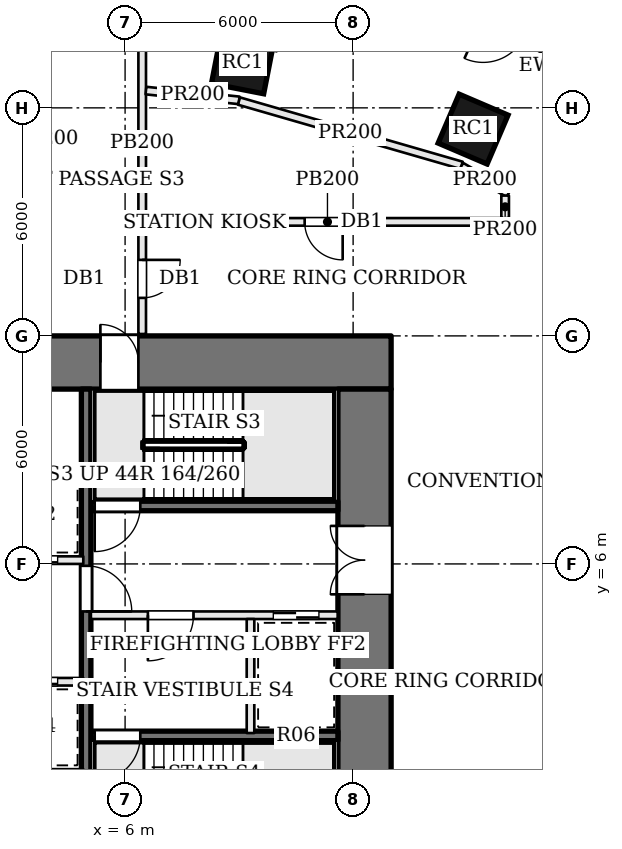
"""IFC4 building model, lengths in metres.
Left out: names, types, materials, properties, quantities, classifications, styles, units other than length and angle.
Written with IfcOpenShell. Run it as: python <this file> out.ifc"""

import sys

from ifc_helpers import new_model, si_unit, direction, frame, frame_2d, origin, origin_2d, place, context, subcontext, project, spatial, rectangle, extrude, element, fill, save


model = new_model("IFC4")
c1 = context("Model", 3, precision=1e-05, world=origin(), true_north=direction((0.0, 1.0)))
c2 = subcontext(c1, "Body", "Model", "MODEL_VIEW")
j1 = project(units=[si_unit("LENGTHUNIT", "METRE"), si_unit("PLANEANGLEUNIT", "RADIAN")], contexts=[c1])
p1 = place(None, origin())
s1 = spatial("IfcSite", under=j1, at=p1, CompositionType="ELEMENT")
p2 = place(p1, origin())
s2 = spatial("IfcBuilding", under=s1, at=p2, CompositionType="ELEMENT")
p3 = place(p2, origin())
s3 = spatial("IfcBuildingStorey", under=s2, at=p3, CompositionType="ELEMENT", Elevation=0.0)
p4 = place(p3, frame((-13.0, 11.3, 0.0), z_axis=(0.0, 0.0, 1.0), x_axis=(1.0, 0.0, 0.0)))
e1 = element("IfcWall", 1, at=p4, inside=s3, PredefinedType="SHEAR", context=c2, shape_type="SweptSolid", body=[
    extrude(rectangle(XDim=26.0, YDim=1.4, at=frame_2d((13.0, 0.0))), origin(), (0.0, 0.0, 1.0), 7.2),
])
p5 = place(p4, frame((8.975, 0.0, 0.0)))
e2 = element("IfcOpeningElement", 2, at=p5, cuts=e1, PredefinedType="OPENING", context=c2, shape_type="SweptSolid", body=[
    extrude(rectangle(XDim=0.7, YDim=2.1, at=frame_2d((0.35, 1.05))), frame((0.0, 0.71, 0.0), z_axis=(0.0, -1.0, 0.0), x_axis=(1.0, 0.0, 0.0)), (0.0, 0.0, 1.0), 1.42),
])
p6 = place(p4, frame((11.425, 0.0, 0.0)))
e3 = element("IfcOpeningElement", 3, at=p6, cuts=e1, PredefinedType="OPENING", context=c2, shape_type="SweptSolid", body=[
    extrude(rectangle(XDim=0.7, YDim=2.1, at=frame_2d((0.35, 1.05))), frame((0.0, 0.71, 0.0), z_axis=(0.0, -1.0, 0.0), x_axis=(1.0, 0.0, 0.0)), (0.0, 0.0, 1.0), 1.42),
])
p7 = place(p4, frame((13.725, 0.0, 0.0)))
e4 = element("IfcOpeningElement", 4, at=p7, cuts=e1, PredefinedType="OPENING", context=c2, shape_type="SweptSolid", body=[
    extrude(rectangle(XDim=1.0, YDim=2.1, at=frame_2d((0.5, 1.05))), frame((0.0, 0.71, 0.0), z_axis=(0.0, -1.0, 0.0), x_axis=(1.0, 0.0, 0.0)), (0.0, 0.0, 1.0), 1.42),
])
p8 = place(p4, frame((15.65, 0.0, 0.0)))
e5 = element("IfcOpeningElement", 5, at=p8, cuts=e1, PredefinedType="OPENING", context=c2, shape_type="SweptSolid", body=[
    extrude(rectangle(XDim=1.0, YDim=2.1, at=frame_2d((0.5, 1.05))), frame((0.0, 0.71, 0.0), z_axis=(0.0, -1.0, 0.0), x_axis=(1.0, 0.0, 0.0)), (0.0, 0.0, 1.0), 1.42),
])
p9 = place(p4, frame((6.65, 0.0, 0.0)))
e6 = element("IfcOpeningElement", 6, at=p9, cuts=e1, PredefinedType="OPENING", context=c2, shape_type="SweptSolid", body=[
    extrude(rectangle(XDim=1.0, YDim=2.1, at=frame_2d((0.5, 1.05))), frame((0.0, 0.71, 0.0), z_axis=(0.0, -1.0, 0.0), x_axis=(1.0, 0.0, 0.0)), (0.0, 0.0, 1.0), 1.42),
])
p10 = place(p4, frame((18.35, 0.0, 0.0)))
e7 = element("IfcOpeningElement", 7, at=p10, cuts=e1, PredefinedType="OPENING", context=c2, shape_type="SweptSolid", body=[
    extrude(rectangle(XDim=1.0, YDim=2.1, at=frame_2d((0.5, 1.05))), frame((0.0, 0.71, 0.0), z_axis=(0.0, -1.0, 0.0), x_axis=(1.0, 0.0, 0.0)), (0.0, 0.0, 1.0), 1.42),
])
p11 = place(p3, frame((12.3, -1.6, 0.0), z_axis=(0.0, 0.0, 1.0), x_axis=(0.0, 1.0, 0.0)))
e8 = element("IfcWall", 8, at=p11, inside=s3, PredefinedType="SHEAR", context=c2, shape_type="SweptSolid", body=[
    extrude(rectangle(XDim=12.2, YDim=1.4, at=frame_2d((6.1, 0.0))), origin(), (0.0, 0.0, 1.0), 7.2),
])
p12 = place(p11, frame((6.8, 0.0, 0.0)))
e9 = element("IfcOpeningElement", 9, at=p12, cuts=e8, PredefinedType="OPENING", context=c2, shape_type="SweptSolid", body=[
    extrude(rectangle(XDim=1.8, YDim=2.1, at=frame_2d((0.9, 1.05))), frame((0.0, 0.71, 0.0), z_axis=(0.0, -1.0, 0.0), x_axis=(1.0, 0.0, 0.0)), (0.0, 0.0, 1.0), 1.42),
])
for number, where, z_axis, x_axis in (
    (10, (15.157, 17.441, 0.0), (0.0, 0.0, 1.0), (-0.919, 0.394, 0.0)),
    (11, (9.094, 19.192, 0.0), (0.0, 0.0, 1.0), (-0.981, 0.192, 0.0)),
):
    element("IfcColumn", number, at=place(p3, frame(where, z_axis=z_axis, x_axis=x_axis)), inside=s3, PredefinedType="COLUMN", context=c2, shape_type="SweptSolid", body=[
        extrude(rectangle(XDim=1.4, YDim=1.4, at=origin_2d()), origin(), (0.0, 0.0, 1.0), 7.2),
    ])
p13 = place(p3, frame((18.934, 18.821, 0.0), z_axis=(0.0, 0.0, 1.0), x_axis=(-0.912571415594, 0.408917365052, 0.0)))
e12 = element("IfcWall", 12, at=p13, inside=s3, PredefinedType="SOLIDWALL", context=c2, shape_type="SweptSolid", body=[
    extrude(rectangle(XDim=4.301, YDim=0.45, at=frame_2d((2.15, 0.0))), origin(), (0.0, 0.0, 1.0), 6.95),
])
p14 = place(p13, frame((0.45, 0.0, 0.9)))
e13 = element("IfcOpeningElement", 13, at=p14, cuts=e12, PredefinedType="OPENING", context=c2, shape_type="SweptSolid", body=[
    extrude(rectangle(XDim=2.1, YDim=5.0, at=frame_2d((1.05, 2.5))), frame((0.0, 0.235, 0.0), z_axis=(0.0, -1.0, 0.0), x_axis=(1.0, 0.0, 0.0)), (0.0, 0.0, 1.0), 0.47),
])
p15 = place(p13, frame((2.651, 0.0, 0.0)))
e14 = element("IfcOpeningElement", 14, at=p15, cuts=e12, PredefinedType="OPENING", context=c2, shape_type="SweptSolid", body=[
    extrude(rectangle(XDim=1.2, YDim=2.4, at=frame_2d((0.6, 1.2))), frame((0.0, 0.235, 0.0), z_axis=(0.0, -1.0, 0.0), x_axis=(1.0, 0.0, 0.0)), (0.0, 0.0, 1.0), 0.47),
])
p16 = place(p3, frame((11.6, 7.525, 0.0), z_axis=(0.0, 0.0, 1.0), x_axis=(-1.0, 0.0, 0.0)))
e15 = element("IfcWall", 15, at=p16, inside=s3, PredefinedType="SOLIDWALL", context=c2, shape_type="SweptSolid", body=[
    extrude(rectangle(XDim=6.5, YDim=0.25, at=frame_2d((3.25, 0.0))), origin(), (0.0, 0.0, 1.0), 6.95),
])
p17 = place(p16, frame((5.2, 0.0, 0.0)))
e16 = element("IfcOpeningElement", 16, at=p17, cuts=e15, PredefinedType="OPENING", context=c2, shape_type="SweptSolid", body=[
    extrude(rectangle(XDim=1.2, YDim=2.1, at=frame_2d((0.6, 1.05))), frame((0.0, 0.135, 0.0), z_axis=(0.0, -1.0, 0.0), x_axis=(1.0, 0.0, 0.0)), (0.0, 0.0, 1.0), 0.27),
])
p18 = place(p3, frame((11.6, 4.65, 0.0), z_axis=(0.0, 0.0, 1.0), x_axis=(-1.0, 0.0, 0.0)))
e17 = element("IfcWall", 17, at=p18, inside=s3, PredefinedType="SOLIDWALL", context=c2, shape_type="SweptSolid", body=[
    extrude(rectangle(XDim=6.5, YDim=0.2, at=frame_2d((3.25, 0.0))), origin(), (0.0, 0.0, 1.0), 6.95),
])
p19 = place(p18, frame((3.8, 0.0, 0.0)))
e18 = element("IfcOpeningElement", 18, at=p19, cuts=e17, PredefinedType="OPENING", context=c2, shape_type="SweptSolid", body=[
    extrude(rectangle(XDim=1.2, YDim=2.1, at=frame_2d((0.6, 1.05))), frame((0.0, 0.11, 0.0), z_axis=(0.0, -1.0, 0.0), x_axis=(1.0, 0.0, 0.0)), (0.0, 0.0, 1.0), 0.22),
])
p20 = place(p18, frame((0.5, 0.0, 0.0)))
e19 = element("IfcOpeningElement", 19, at=p20, cuts=e17, PredefinedType="OPENING", context=c2, shape_type="SweptSolid", body=[
    extrude(rectangle(XDim=1.2, YDim=2.1, at=frame_2d((0.6, 1.05))), frame((0.0, 0.11, 0.0), z_axis=(0.0, -1.0, 0.0), x_axis=(1.0, 0.0, 0.0)), (0.0, 0.0, 1.0), 0.22),
])
p21 = place(p3, frame((11.6, 1.475, 0.0), z_axis=(0.0, 0.0, 1.0), x_axis=(-1.0, 0.0, 0.0)))
e20 = element("IfcWall", 20, at=p21, inside=s3, PredefinedType="SOLIDWALL", context=c2, shape_type="SweptSolid", body=[
    extrude(rectangle(XDim=6.5, YDim=0.25, at=frame_2d((3.25, 0.0))), origin(), (0.0, 0.0, 1.0), 6.95),
])
p22 = place(p21, frame((5.2, 0.0, 0.0)))
e21 = element("IfcOpeningElement", 21, at=p22, cuts=e20, PredefinedType="OPENING", context=c2, shape_type="SweptSolid", body=[
    extrude(rectangle(XDim=1.2, YDim=2.1, at=frame_2d((0.6, 1.05))), frame((0.0, 0.135, 0.0), z_axis=(0.0, -1.0, 0.0), x_axis=(1.0, 0.0, 0.0)), (0.0, 0.0, 1.0), 0.27),
])
p23 = place(p3, frame((9.3, 4.55, 0.0), z_axis=(0.0, 0.0, 1.0), x_axis=(0.0, -1.0, 0.0)))
e22 = element("IfcWall", 22, at=p23, inside=s3, PredefinedType="SOLIDWALL", context=c2, shape_type="SweptSolid", body=[
    extrude(rectangle(XDim=3.0, YDim=0.2, at=frame_2d((1.5, 0.0))), origin(), (0.0, 0.0, 1.0), 6.95),
])
p24 = place(p3, frame((4.975, 10.6, 0.0), z_axis=(0.0, 0.0, 1.0), x_axis=(0.0, -1.0, 0.0)))
e23 = element("IfcWall", 23, at=p24, inside=s3, PredefinedType="SOLIDWALL", context=c2, shape_type="SweptSolid", body=[
    extrude(rectangle(XDim=12.2, YDim=0.25, at=frame_2d((6.1, 0.0))), origin(), (0.0, 0.0, 1.0), 6.95),
])
p25 = place(p24, frame((4.65, 0.0, 0.0)))
e24 = element("IfcOpeningElement", 24, at=p25, cuts=e23, PredefinedType="OPENING", context=c2, shape_type="SweptSolid", body=[
    extrude(rectangle(XDim=1.2, YDim=2.1, at=frame_2d((0.6, 1.05))), frame((0.0, 0.135, 0.0), z_axis=(0.0, -1.0, 0.0), x_axis=(1.0, 0.0, 0.0)), (0.0, 0.0, 1.0), 0.27),
])
p26 = place(p3, frame((-4.9, 2.9, 0.0), z_axis=(0.0, 0.0, 1.0), x_axis=(1.0, 0.0, 0.0)))
e25 = element("IfcWall", 25, at=p26, inside=s3, PredefinedType="SOLIDWALL", context=c2, shape_type="SweptSolid", body=[
    extrude(rectangle(XDim=9.8, YDim=0.2, at=frame_2d((4.9, 0.0))), origin(), (0.0, 0.0, 1.0), 6.95),
])
p27 = place(p26, frame((0.675, 0.0, 0.0)))
e26 = element("IfcOpeningElement", 26, at=p27, cuts=e25, PredefinedType="OPENING", context=c2, shape_type="SweptSolid", body=[
    extrude(rectangle(XDim=1.1, YDim=2.1, at=frame_2d((0.55, 1.05))), frame((0.0, 0.11, 0.0), z_axis=(0.0, -1.0, 0.0), x_axis=(1.0, 0.0, 0.0)), (0.0, 0.0, 1.0), 0.22),
])
p28 = place(p26, frame((3.125, 0.0, 0.0)))
e27 = element("IfcOpeningElement", 27, at=p28, cuts=e25, PredefinedType="OPENING", context=c2, shape_type="SweptSolid", body=[
    extrude(rectangle(XDim=1.1, YDim=2.1, at=frame_2d((0.55, 1.05))), frame((0.0, 0.11, 0.0), z_axis=(0.0, -1.0, 0.0), x_axis=(1.0, 0.0, 0.0)), (0.0, 0.0, 1.0), 0.22),
])
p29 = place(p26, frame((5.575, 0.0, 0.0)))
e28 = element("IfcOpeningElement", 28, at=p29, cuts=e25, PredefinedType="OPENING", context=c2, shape_type="SweptSolid", body=[
    extrude(rectangle(XDim=1.1, YDim=2.1, at=frame_2d((0.55, 1.05))), frame((0.0, 0.11, 0.0), z_axis=(0.0, -1.0, 0.0), x_axis=(1.0, 0.0, 0.0)), (0.0, 0.0, 1.0), 0.22),
])
p30 = place(p26, frame((8.025, 0.0, 0.0)))
e29 = element("IfcOpeningElement", 29, at=p30, cuts=e25, PredefinedType="OPENING", context=c2, shape_type="SweptSolid", body=[
    extrude(rectangle(XDim=1.1, YDim=2.1, at=frame_2d((0.55, 1.05))), frame((0.0, 0.11, 0.0), z_axis=(0.0, -1.0, 0.0), x_axis=(1.0, 0.0, 0.0)), (0.0, 0.0, 1.0), 0.22),
])
p31 = place(p3, frame((-4.9, 6.1, 0.0), z_axis=(0.0, 0.0, 1.0), x_axis=(1.0, 0.0, 0.0)))
e30 = element("IfcWall", 30, at=p31, inside=s3, PredefinedType="SOLIDWALL", context=c2, shape_type="SweptSolid", body=[
    extrude(rectangle(XDim=9.8, YDim=0.2, at=frame_2d((4.9, 0.0))), origin(), (0.0, 0.0, 1.0), 6.95),
])
p32 = place(p31, frame((0.675, 0.0, 0.0)))
e31 = element("IfcOpeningElement", 31, at=p32, cuts=e30, PredefinedType="OPENING", context=c2, shape_type="SweptSolid", body=[
    extrude(rectangle(XDim=1.1, YDim=2.1, at=frame_2d((0.55, 1.05))), frame((0.0, 0.11, 0.0), z_axis=(0.0, -1.0, 0.0), x_axis=(1.0, 0.0, 0.0)), (0.0, 0.0, 1.0), 0.22),
])
p33 = place(p31, frame((3.125, 0.0, 0.0)))
e32 = element("IfcOpeningElement", 32, at=p33, cuts=e30, PredefinedType="OPENING", context=c2, shape_type="SweptSolid", body=[
    extrude(rectangle(XDim=1.1, YDim=2.1, at=frame_2d((0.55, 1.05))), frame((0.0, 0.11, 0.0), z_axis=(0.0, -1.0, 0.0), x_axis=(1.0, 0.0, 0.0)), (0.0, 0.0, 1.0), 0.22),
])
p34 = place(p31, frame((5.575, 0.0, 0.0)))
e33 = element("IfcOpeningElement", 33, at=p34, cuts=e30, PredefinedType="OPENING", context=c2, shape_type="SweptSolid", body=[
    extrude(rectangle(XDim=1.1, YDim=2.1, at=frame_2d((0.55, 1.05))), frame((0.0, 0.11, 0.0), z_axis=(0.0, -1.0, 0.0), x_axis=(1.0, 0.0, 0.0)), (0.0, 0.0, 1.0), 0.22),
])
p35 = place(p31, frame((8.025, 0.0, 0.0)))
e34 = element("IfcOpeningElement", 34, at=p35, cuts=e30, PredefinedType="OPENING", context=c2, shape_type="SweptSolid", body=[
    extrude(rectangle(XDim=1.1, YDim=2.1, at=frame_2d((0.55, 1.05))), frame((0.0, 0.11, 0.0), z_axis=(0.0, -1.0, 0.0), x_axis=(1.0, 0.0, 0.0)), (0.0, 0.0, 1.0), 0.22),
])
p36 = place(p3, frame((-4.9, 8.5, 0.0), z_axis=(0.0, 0.0, 1.0), x_axis=(1.0, 0.0, 0.0)))
e35 = element("IfcWall", 35, at=p36, inside=s3, PredefinedType="SOLIDWALL", context=c2, shape_type="SweptSolid", body=[
    extrude(rectangle(XDim=9.8, YDim=0.2, at=frame_2d((4.9, 0.0))), origin(), (0.0, 0.0, 1.0), 6.95),
])
p37 = place(p3, frame((6.45, 22.097, 0.0), z_axis=(0.0, 0.0, 1.0), x_axis=(0.0, -1.0, 0.0)))
e36 = element("IfcWall", 36, at=p37, inside=s3, PredefinedType="PARTITIONING", context=c2, shape_type="SweptSolid", body=[
    extrude(rectangle(XDim=10.047, YDim=0.2, at=frame_2d((5.023, 0.0))), origin(), (0.0, 0.0, 1.0), 6.23),
])
p38 = place(p37, frame((8.097, 0.0, 0.0)))
e37 = element("IfcOpeningElement", 37, at=p38, cuts=e36, PredefinedType="OPENING", context=c2, shape_type="SweptSolid", body=[
    extrude(rectangle(XDim=1.0, YDim=2.1, at=frame_2d((0.5, 1.05))), frame((0.0, 0.11, 0.0), z_axis=(0.0, -1.0, 0.0), x_axis=(1.0, 0.0, 0.0)), (0.0, 0.0, 1.0), 0.22),
])
p39 = place(p3, frame((16.1, 15.0, 0.0), z_axis=(0.0, 0.0, 1.0), x_axis=(-1.0, 0.0, 0.0)))
e38 = element("IfcWall", 38, at=p39, inside=s3, PredefinedType="PARTITIONING", context=c2, shape_type="SweptSolid", body=[
    extrude(rectangle(XDim=9.55, YDim=0.2, at=frame_2d((4.775, 0.0))), origin(), (0.0, 0.0, 1.0), 6.23),
])
p40 = place(p39, frame((4.375, 0.0, 0.0)))
e39 = element("IfcOpeningElement", 39, at=p40, cuts=e38, PredefinedType="OPENING", context=c2, shape_type="SweptSolid", body=[
    extrude(rectangle(XDim=1.0, YDim=2.1, at=frame_2d((0.5, 1.05))), frame((0.0, 0.11, 0.0), z_axis=(0.0, -1.0, 0.0), x_axis=(1.0, 0.0, 0.0)), (0.0, 0.0, 1.0), 0.22),
])
p41 = place(p3, frame((6.549, 18.455, 0.0), z_axis=(0.0, 0.0, 1.0), x_axis=(0.994502738507, -0.104710568244, 0.0)))
e40 = element("IfcWall", 40, at=p41, inside=s3, PredefinedType="PARTITIONING", context=c2, shape_type="SweptSolid", body=[
    extrude(rectangle(XDim=2.464, YDim=0.2, at=frame_2d((1.232, 0.0))), origin(), (0.0, 0.0, 1.0), 6.58),
])
p42 = place(p3, frame((8.997, 18.179, 0.0), z_axis=(0.0, 0.0, 1.0), x_axis=(0.960743591904, -0.277437831982, 0.0)))
e41 = element("IfcWall", 41, at=p42, inside=s3, PredefinedType="PARTITIONING", context=c2, shape_type="SweptSolid", body=[
    extrude(rectangle(XDim=6.098, YDim=0.2, at=frame_2d((3.049, 0.0))), origin(), (0.0, 0.0, 1.0), 6.58),
])
p43 = place(p3, frame((14.846, 16.465, 0.0), z_axis=(0.0, 0.0, 1.0), x_axis=(0.863834413875, -0.503775848375, 0.0)))
e42 = element("IfcWall", 42, at=p43, inside=s3, PredefinedType="PARTITIONING", context=c2, shape_type="SweptSolid", body=[
    extrude(rectangle(XDim=1.436, YDim=0.2, at=frame_2d((0.718, 0.0))), origin(), (0.0, 0.0, 1.0), 6.58),
])
p44 = place(p3, frame((16.0, 15.692, 0.0), z_axis=(0.0, 0.0, 1.0), x_axis=(0.0, -1.0, 0.0)))
e43 = element("IfcWall", 43, at=p44, inside=s3, PredefinedType="PARTITIONING", context=c2, shape_type="SweptSolid", body=[
    extrude(rectangle(XDim=0.592, YDim=0.2, at=frame_2d((0.296, 0.0))), origin(), (0.0, 0.0, 1.0), 6.58),
])
p45 = place(p14, origin())
e44 = element("IfcWindow", 44, at=p45, inside=s3, PartitioningType="SINGLE_PANEL", PredefinedType="WINDOW", context=c2, shape_type="SweptSolid", body=[
    extrude(rectangle(XDim=2.1, YDim=5.0, at=frame_2d((1.05, 2.5))), frame((0.0, 0.135, 0.0), z_axis=(0.0, -1.0, 0.0), x_axis=(1.0, 0.0, 0.0)), (0.0, 0.0, 1.0), 0.06),
])
fill(e13, e44)
p46 = place(p12, origin())
e45 = element("IfcDoor", 45, at=p46, inside=s3, OperationType="DOUBLE_DOOR_SINGLE_SWING", PredefinedType="DOOR", context=c2, shape_type="SweptSolid", body=[
    extrude(rectangle(XDim=1.8, YDim=2.1, at=frame_2d((0.9, 1.05))), frame((0.0, 0.025, 0.0), z_axis=(0.0, -1.0, 0.0), x_axis=(1.0, 0.0, 0.0)), (0.0, 0.0, 1.0), 0.05),
])
fill(e9, e45)
p47 = place(p25, origin())
e46 = element("IfcDoor", 46, at=p47, inside=s3, OperationType="SINGLE_SWING_RIGHT", PredefinedType="DOOR", context=c2, shape_type="SweptSolid", body=[
    extrude(rectangle(XDim=1.2, YDim=2.1, at=frame_2d((0.6, 1.05))), frame((0.0, 0.025, 0.0), z_axis=(0.0, -1.0, 0.0), x_axis=(1.0, 0.0, 0.0)), (0.0, 0.0, 1.0), 0.05),
])
fill(e24, e46)
p48 = place(p19, origin())
e47 = element("IfcDoor", 47, at=p48, inside=s3, OperationType="SINGLE_SWING_RIGHT", PredefinedType="DOOR", context=c2, shape_type="SweptSolid", body=[
    extrude(rectangle(XDim=1.2, YDim=2.1, at=frame_2d((0.6, 1.05))), frame((0.0, 0.025, 0.0), z_axis=(0.0, -1.0, 0.0), x_axis=(1.0, 0.0, 0.0)), (0.0, 0.0, 1.0), 0.05),
])
fill(e18, e47)
p49 = place(p17, origin())
e48 = element("IfcDoor", 48, at=p49, inside=s3, OperationType="SINGLE_SWING_RIGHT", PredefinedType="DOOR", context=c2, shape_type="SweptSolid", body=[
    extrude(rectangle(XDim=1.2, YDim=2.1, at=frame_2d((0.6, 1.05))), frame((0.0, 0.025, 0.0), z_axis=(0.0, -1.0, 0.0), x_axis=(1.0, 0.0, 0.0)), (0.0, 0.0, 1.0), 0.05),
])
fill(e16, e48)
p50 = place(p22, origin())
e49 = element("IfcDoor", 49, at=p50, inside=s3, OperationType="SINGLE_SWING_RIGHT", PredefinedType="DOOR", context=c2, shape_type="SweptSolid", body=[
    extrude(rectangle(XDim=1.2, YDim=2.1, at=frame_2d((0.6, 1.05))), frame((0.0, 0.025, 0.0), z_axis=(0.0, -1.0, 0.0), x_axis=(1.0, 0.0, 0.0)), (0.0, 0.0, 1.0), 0.05),
])
fill(e21, e49)
p51 = place(p20, origin())
e50 = element("IfcDoor", 50, at=p51, inside=s3, OperationType="SLIDING_TO_RIGHT", PredefinedType="DOOR", context=c2, shape_type="SweptSolid", body=[
    extrude(rectangle(XDim=1.2, YDim=2.1, at=frame_2d((0.6, 1.05))), frame((0.0, 0.025, 0.0), z_axis=(0.0, -1.0, 0.0), x_axis=(1.0, 0.0, 0.0)), (0.0, 0.0, 1.0), 0.05),
])
fill(e19, e50)
p52 = place(p30, origin())
e51 = element("IfcDoor", 51, at=p52, inside=s3, OperationType="SLIDING_TO_RIGHT", PredefinedType="DOOR", context=c2, shape_type="SweptSolid", body=[
    extrude(rectangle(XDim=1.1, YDim=2.1, at=frame_2d((0.55, 1.05))), frame((0.0, 0.025, 0.0), z_axis=(0.0, -1.0, 0.0), x_axis=(1.0, 0.0, 0.0)), (0.0, 0.0, 1.0), 0.05),
])
fill(e29, e51)
p53 = place(p35, origin())
e52 = element("IfcDoor", 52, at=p53, inside=s3, OperationType="SLIDING_TO_LEFT", PredefinedType="DOOR", context=c2, shape_type="SweptSolid", body=[
    extrude(rectangle(XDim=1.1, YDim=2.1, at=frame_2d((0.55, 1.05))), frame((0.0, 0.025, 0.0), z_axis=(0.0, -1.0, 0.0), x_axis=(1.0, 0.0, 0.0)), (0.0, 0.0, 1.0), 0.05),
])
fill(e34, e52)
p54 = place(p10, origin())
e53 = element("IfcDoor", 53, at=p54, inside=s3, OperationType="SINGLE_SWING_LEFT", PredefinedType="DOOR", context=c2, shape_type="SweptSolid", body=[
    extrude(rectangle(XDim=1.0, YDim=2.1, at=frame_2d((0.5, 1.05))), frame((0.0, 0.025, 0.0), z_axis=(0.0, -1.0, 0.0), x_axis=(1.0, 0.0, 0.0)), (0.0, 0.0, 1.0), 0.05),
])
fill(e7, e53)
p55 = place(p38, origin())
e54 = element("IfcDoor", 54, at=p55, inside=s3, OperationType="SINGLE_SWING_LEFT", PredefinedType="DOOR", context=c2, shape_type="SweptSolid", body=[
    extrude(rectangle(XDim=1.0, YDim=2.1, at=frame_2d((0.5, 1.05))), frame((0.0, 0.025, 0.0), z_axis=(0.0, -1.0, 0.0), x_axis=(1.0, 0.0, 0.0)), (0.0, 0.0, 1.0), 0.05),
])
fill(e37, e54)
p56 = place(p40, origin())
e55 = element("IfcDoor", 55, at=p56, inside=s3, OperationType="SINGLE_SWING_LEFT", PredefinedType="DOOR", context=c2, shape_type="SweptSolid", body=[
    extrude(rectangle(XDim=1.0, YDim=2.1, at=frame_2d((0.5, 1.05))), frame((0.0, 0.025, 0.0), z_axis=(0.0, -1.0, 0.0), x_axis=(1.0, 0.0, 0.0)), (0.0, 0.0, 1.0), 0.05),
])
fill(e39, e55)
save(model, sys.argv[1])
